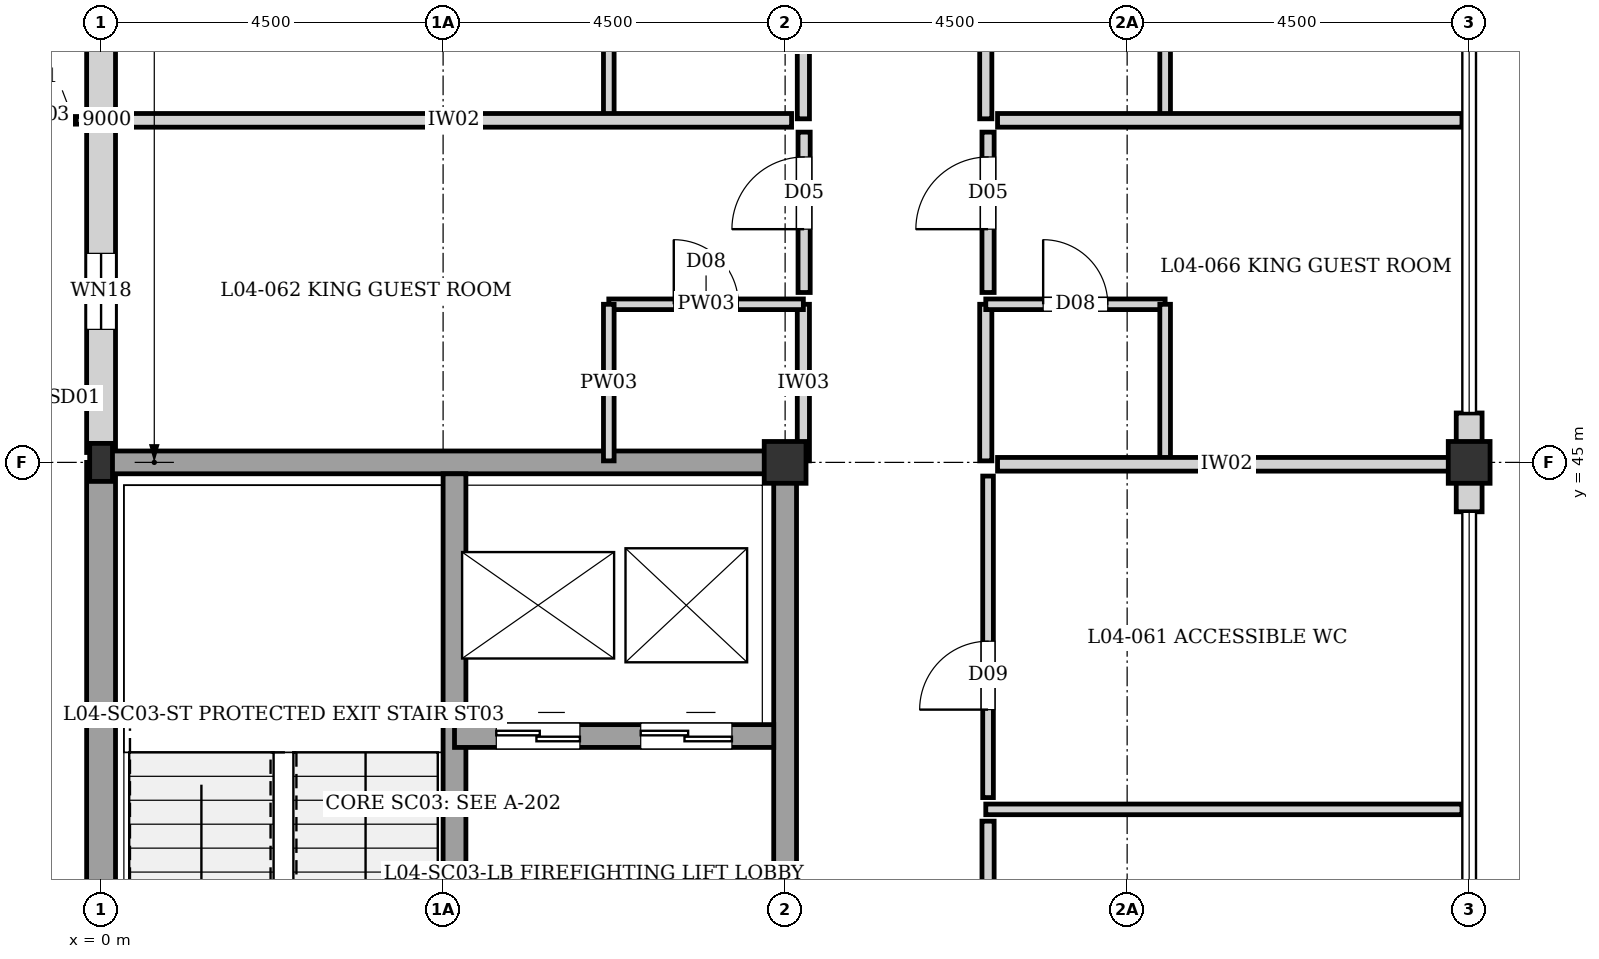
"""IFC4 building model, lengths in metres.
Left out: names, types, materials, properties, quantities, classifications, styles, units other than length and angle.
Written with IfcOpenShell. Run it as: python <this file> out.ifc"""

import sys

from ifc_helpers import new_model, si_unit, direction, frame, frame_2d, origin, origin_2d, place, context, subcontext, project, spatial, rectangle, i_section, extrude, element, fill, save


model = new_model("IFC4")
c1 = context("Model", 3, precision=1e-05, world=origin(), true_north=direction((0.0, 1.0)))
c2 = subcontext(c1, "Body", "Model", "MODEL_VIEW")
j1 = project(units=[si_unit("LENGTHUNIT", "METRE"), si_unit("PLANEANGLEUNIT", "RADIAN")], contexts=[c1])
p1 = place(None, origin())
s1 = spatial("IfcSite", under=j1, at=p1, CompositionType="ELEMENT")
p2 = place(p1, origin())
s2 = spatial("IfcBuilding", under=s1, at=p2, CompositionType="ELEMENT")
p3 = place(p2, frame((0.0, 0.0, 14.56)))
s3 = spatial("IfcBuildingStorey", under=s2, at=p3, CompositionType="ELEMENT", Elevation=14.56)
p4 = place(p3, frame((0.0, 45.0, 0.0), z_axis=(0.0, 0.0, 1.0), x_axis=(1.0, 0.0, 0.0)))
e1 = element("IfcColumn", 1, at=p4, inside=s3, PredefinedType="COLUMN", context=c2, shape_type="SweptSolid", body=[
    extrude(i_section(OverallWidth=0.3, OverallDepth=0.5, WebThickness=0.014, FlangeThickness=0.028, at=origin_2d()), origin(), (0.0, 0.0, 1.0), 3.04),
])
for number, where, z_axis, x_axis in (
    (2, (9.0, 45.0, 0.0), (0.0, 0.0, 1.0), (1.0, 0.0, 0.0)),
    (3, (18.0, 45.0, 0.0), (0.0, 0.0, 1.0), (1.0, 0.0, 0.0)),
):
    element("IfcColumn", number, at=place(p3, frame(where, z_axis=z_axis, x_axis=x_axis)), inside=s3, PredefinedType="COLUMN", context=c2, shape_type="SweptSolid", body=[
        extrude(rectangle(XDim=0.55, YDim=0.55, at=origin_2d()), origin(), (0.0, 0.0, 1.0), 3.04),
    ])
p5 = place(p3, frame((0.0, 36.0, 0.0), z_axis=(0.0, 0.0, 1.0), x_axis=(0.0, 1.0, 0.0)))
e4 = element("IfcWall", 4, at=p5, inside=s3, PredefinedType="SOLIDWALL", context=c2, shape_type="SweptSolid", body=[
    extrude(rectangle(XDim=9.0, YDim=0.38, at=frame_2d((4.5, 0.0))), origin(), (0.0, 0.0, 1.0), 2.82),
])
p6 = place(p3, frame((0.0, 45.13, 0.0), z_axis=(0.0, 0.0, 1.0), x_axis=(0.0, 1.0, 0.0)))
e5 = element("IfcWall", 5, at=p6, inside=s3, PredefinedType="SOLIDWALL", context=c2, shape_type="SweptSolid", body=[
    extrude(rectangle(XDim=8.87, YDim=0.38, at=frame_2d((4.435, 0.0))), origin(), (0.0, 0.0, 1.0), 2.82),
])
p7 = place(p6, frame((1.62, 0.0, 0.35)))
e6 = element("IfcOpeningElement", 6, at=p7, cuts=e5, PredefinedType="OPENING", context=c2, shape_type="SweptSolid", body=[
    extrude(rectangle(XDim=1.0, YDim=1.6, at=frame_2d((0.5, 0.8))), frame((0.0, 0.2, 0.0), z_axis=(0.0, -1.0, 0.0), x_axis=(1.0, 0.0, 0.0)), (0.0, 0.0, 1.0), 0.4),
])
p8 = place(p6, frame((6.12, 0.0, 0.35)))
e7 = element("IfcOpeningElement", 7, at=p8, cuts=e5, PredefinedType="OPENING", context=c2, shape_type="SweptSolid", body=[
    extrude(rectangle(XDim=1.0, YDim=1.6, at=frame_2d((0.5, 0.8))), frame((0.0, 0.2, 0.0), z_axis=(0.0, -1.0, 0.0), x_axis=(1.0, 0.0, 0.0)), (0.0, 0.0, 1.0), 0.4),
])
p9 = place(p3, frame((18.0, 45.65, 0.0), z_axis=(0.0, 0.0, 1.0), x_axis=(0.0, -1.0, 0.0)))
e8 = element("IfcWall", 8, at=p9, inside=s3, PredefinedType="SOLIDWALL", context=c2, shape_type="SweptSolid", body=[
    extrude(rectangle(XDim=0.65, YDim=0.34, at=frame_2d((0.325, 0.0))), origin(), (0.0, 0.0, 1.0), 2.82),
])
p10 = place(p3, frame((18.0, 45.0, 0.0), z_axis=(0.0, 0.0, 1.0), x_axis=(0.0, -1.0, 0.0)))
e9 = element("IfcWall", 9, at=p10, inside=s3, PredefinedType="SOLIDWALL", context=c2, shape_type="SweptSolid", body=[
    extrude(rectangle(XDim=0.65, YDim=0.34, at=frame_2d((0.325, 0.0))), origin(), (0.0, 0.0, 1.0), 2.38),
])
p11 = place(p3, frame((9.0, 36.0, 0.0), z_axis=(0.0, 0.0, 1.0), x_axis=(0.0, 1.0, 0.0)))
e10 = element("IfcWall", 10, at=p11, inside=s3, PredefinedType="SHEAR", context=c2, shape_type="SweptSolid", body=[
    extrude(rectangle(XDim=9.0, YDim=0.3, at=frame_2d((4.5, 0.0))), origin(), (0.0, 0.0, 1.0), 2.82),
])
p12 = place(p11, frame((2.05, 0.0, 0.0)))
e11 = element("IfcOpeningElement", 11, at=p12, cuts=e10, PredefinedType="OPENING", context=c2, shape_type="SweptSolid", body=[
    extrude(rectangle(XDim=1.4, YDim=2.02, at=frame_2d((0.7, 1.01))), frame((0.0, 0.16, 0.0), z_axis=(0.0, -1.0, 0.0), x_axis=(1.0, 0.0, 0.0)), (0.0, 0.0, 1.0), 0.32),
])
p13 = place(p3, frame((0.0, 45.0, 0.0), z_axis=(0.0, 0.0, 1.0), x_axis=(1.0, 0.0, 0.0)))
e12 = element("IfcWall", 12, at=p13, inside=s3, PredefinedType="SHEAR", context=c2, shape_type="SweptSolid", body=[
    extrude(rectangle(XDim=9.0, YDim=0.3, at=frame_2d((4.5, 0.0))), origin(), (0.0, 0.0, 1.0), 2.82),
])
p14 = place(p3, frame((4.65, 36.15, 0.0), z_axis=(0.0, 0.0, 1.0), x_axis=(0.0, 1.0, 0.0)))
e13 = element("IfcWall", 13, at=p14, inside=s3, PredefinedType="SHEAR", context=c2, shape_type="SweptSolid", body=[
    extrude(rectangle(XDim=8.7, YDim=0.3, at=frame_2d((4.35, 0.0))), origin(), (0.0, 0.0, 1.0), 2.82),
])
p15 = place(p14, frame((0.35, 0.0, 0.0)))
e14 = element("IfcOpeningElement", 14, at=p15, cuts=e13, PredefinedType="OPENING", context=c2, shape_type="SweptSolid", body=[
    extrude(rectangle(XDim=1.4, YDim=2.02, at=frame_2d((0.7, 1.01))), frame((0.0, 0.16, 0.0), z_axis=(0.0, -1.0, 0.0), x_axis=(1.0, 0.0, 0.0)), (0.0, 0.0, 1.0), 0.32),
])
p16 = place(p3, frame((4.65, 41.4, 0.0), z_axis=(0.0, 0.0, 1.0), x_axis=(1.0, 0.0, 0.0)))
e15 = element("IfcWall", 15, at=p16, inside=s3, PredefinedType="SHEAR", context=c2, shape_type="SweptSolid", body=[
    extrude(rectangle(XDim=4.2, YDim=0.3, at=frame_2d((2.1, 0.0))), origin(), (0.0, 0.0, 1.0), 2.82),
])
p17 = place(p16, frame((0.55, 0.0, 0.0)))
e16 = element("IfcOpeningElement", 16, at=p17, cuts=e15, PredefinedType="OPENING", context=c2, shape_type="SweptSolid", body=[
    extrude(rectangle(XDim=1.1, YDim=2.1, at=frame_2d((0.55, 1.05))), frame((0.0, 0.16, 0.0), z_axis=(0.0, -1.0, 0.0), x_axis=(1.0, 0.0, 0.0)), (0.0, 0.0, 1.0), 0.32),
])
p18 = place(p16, frame((2.45, 0.0, 0.0)))
e17 = element("IfcOpeningElement", 17, at=p18, cuts=e15, PredefinedType="OPENING", context=c2, shape_type="SweptSolid", body=[
    extrude(rectangle(XDim=1.2, YDim=2.2, at=frame_2d((0.6, 1.1))), frame((0.0, 0.16, 0.0), z_axis=(0.0, -1.0, 0.0), x_axis=(1.0, 0.0, 0.0)), (0.0, 0.0, 1.0), 0.32),
])
p19 = place(p3, frame((9.24, 45.02, 0.0), z_axis=(0.0, 0.0, 1.0), x_axis=(0.0, 1.0, 0.0)))
e18 = element("IfcWall", 18, at=p19, inside=s3, PredefinedType="PARTITIONING", context=c2, shape_type="SweptSolid", body=[
    extrude(rectangle(XDim=2.06, YDim=0.16, at=frame_2d((1.03, 0.0))), origin(), (0.0, 0.0, 1.0), 2.82),
])
p20 = place(p3, frame((6.68, 47.08, 0.0), z_axis=(0.0, 0.0, 1.0), x_axis=(1.0, 0.0, 0.0)))
e19 = element("IfcWall", 19, at=p20, inside=s3, PredefinedType="PLUMBINGWALL", context=c2, shape_type="SweptSolid", body=[
    extrude(rectangle(XDim=2.56, YDim=0.14, at=frame_2d((1.28, 0.0))), origin(), (0.0, 0.0, 1.0), 2.82),
])
p21 = place(p20, frame((0.855, 0.0, 0.0)))
e20 = element("IfcOpeningElement", 20, at=p21, cuts=e19, PredefinedType="OPENING", context=c2, shape_type="SweptSolid", body=[
    extrude(rectangle(XDim=0.85, YDim=2.04, at=frame_2d((0.425, 1.02))), frame((0.0, 0.08, 0.0), z_axis=(0.0, -1.0, 0.0), x_axis=(1.0, 0.0, 0.0)), (0.0, 0.0, 1.0), 0.16),
])
p22 = place(p3, frame((6.68, 45.02, 0.0), z_axis=(0.0, 0.0, 1.0), x_axis=(0.0, 1.0, 0.0)))
e21 = element("IfcWall", 21, at=p22, inside=s3, PredefinedType="PLUMBINGWALL", context=c2, shape_type="SweptSolid", body=[
    extrude(rectangle(XDim=2.06, YDim=0.14, at=frame_2d((1.03, 0.0))), origin(), (0.0, 0.0, 1.0), 2.82),
])
p23 = place(p3, frame((9.24, 49.52, 0.0), z_axis=(0.0, 0.0, 1.0), x_axis=(0.0, 1.0, 0.0)))
e22 = element("IfcWall", 22, at=p23, inside=s3, PredefinedType="PARTITIONING", context=c2, shape_type="SweptSolid", body=[
    extrude(rectangle(XDim=2.06, YDim=0.16, at=frame_2d((1.03, 0.0))), origin(), (0.0, 0.0, 1.0), 2.82),
])
p24 = place(p3, frame((6.68, 49.52, 0.0), z_axis=(0.0, 0.0, 1.0), x_axis=(0.0, 1.0, 0.0)))
e23 = element("IfcWall", 23, at=p24, inside=s3, PredefinedType="PLUMBINGWALL", context=c2, shape_type="SweptSolid", body=[
    extrude(rectangle(XDim=2.06, YDim=0.14, at=frame_2d((1.03, 0.0))), origin(), (0.0, 0.0, 1.0), 2.82),
])
p25 = place(p3, frame((11.64, 45.02, 0.0), z_axis=(0.0, 0.0, 1.0), x_axis=(0.0, 1.0, 0.0)))
e24 = element("IfcWall", 24, at=p25, inside=s3, PredefinedType="PARTITIONING", context=c2, shape_type="SweptSolid", body=[
    extrude(rectangle(XDim=2.06, YDim=0.16, at=frame_2d((1.03, 0.0))), origin(), (0.0, 0.0, 1.0), 2.82),
])
p26 = place(p3, frame((11.64, 47.08, 0.0), z_axis=(0.0, 0.0, 1.0), x_axis=(1.0, 0.0, 0.0)))
e25 = element("IfcWall", 25, at=p26, inside=s3, PredefinedType="PLUMBINGWALL", context=c2, shape_type="SweptSolid", body=[
    extrude(rectangle(XDim=2.36, YDim=0.14, at=frame_2d((1.18, 0.0))), origin(), (0.0, 0.0, 1.0), 2.82),
])
p27 = place(p26, frame((0.755, 0.0, 0.0)))
e26 = element("IfcOpeningElement", 26, at=p27, cuts=e25, PredefinedType="OPENING", context=c2, shape_type="SweptSolid", body=[
    extrude(rectangle(XDim=0.85, YDim=2.04, at=frame_2d((0.425, 1.02))), frame((0.0, 0.08, 0.0), z_axis=(0.0, -1.0, 0.0), x_axis=(1.0, 0.0, 0.0)), (0.0, 0.0, 1.0), 0.16),
])
p28 = place(p3, frame((14.0, 45.02, 0.0), z_axis=(0.0, 0.0, 1.0), x_axis=(0.0, 1.0, 0.0)))
e27 = element("IfcWall", 27, at=p28, inside=s3, PredefinedType="PLUMBINGWALL", context=c2, shape_type="SweptSolid", body=[
    extrude(rectangle(XDim=2.06, YDim=0.14, at=frame_2d((1.03, 0.0))), origin(), (0.0, 0.0, 1.0), 2.82),
])
p29 = place(p3, frame((11.64, 49.52, 0.0), z_axis=(0.0, 0.0, 1.0), x_axis=(0.0, 1.0, 0.0)))
e28 = element("IfcWall", 28, at=p29, inside=s3, PredefinedType="PARTITIONING", context=c2, shape_type="SweptSolid", body=[
    extrude(rectangle(XDim=2.06, YDim=0.16, at=frame_2d((1.03, 0.0))), origin(), (0.0, 0.0, 1.0), 2.82),
])
p30 = place(p3, frame((14.0, 49.52, 0.0), z_axis=(0.0, 0.0, 1.0), x_axis=(0.0, 1.0, 0.0)))
e29 = element("IfcWall", 29, at=p30, inside=s3, PredefinedType="PLUMBINGWALL", context=c2, shape_type="SweptSolid", body=[
    extrude(rectangle(XDim=2.06, YDim=0.14, at=frame_2d((1.03, 0.0))), origin(), (0.0, 0.0, 1.0), 2.82),
])
p31 = place(p3, frame((11.795, 44.975, 0.0), z_axis=(0.0, 0.0, 1.0), x_axis=(1.0, 0.0, 0.0)))
e30 = element("IfcWall", 30, at=p31, inside=s3, PredefinedType="PARTITIONING", context=c2, shape_type="SweptSolid", body=[
    extrude(rectangle(XDim=6.03, YDim=0.18, at=frame_2d((3.015, 0.0))), origin(), (0.0, 0.0, 1.0), 2.38),
])
p32 = place(p3, frame((0.195, 49.5, 0.0), z_axis=(0.0, 0.0, 1.0), x_axis=(1.0, 0.0, 0.0)))
e31 = element("IfcWall", 31, at=p32, inside=s3, PredefinedType="PARTITIONING", context=c2, shape_type="SweptSolid", body=[
    extrude(rectangle(XDim=8.89, YDim=0.18, at=frame_2d((4.445, 0.0))), origin(), (0.0, 0.0, 1.0), 2.82),
])
p33 = place(p3, frame((11.795, 49.5, 0.0), z_axis=(0.0, 0.0, 1.0), x_axis=(1.0, 0.0, 0.0)))
e32 = element("IfcWall", 32, at=p33, inside=s3, PredefinedType="PARTITIONING", context=c2, shape_type="SweptSolid", body=[
    extrude(rectangle(XDim=6.11, YDim=0.18, at=frame_2d((3.055, 0.0))), origin(), (0.0, 0.0, 1.0), 2.82),
])
p34 = place(p3, frame((11.64, 40.435, 0.0), z_axis=(0.0, 0.0, 1.0), x_axis=(1.0, 0.0, 0.0)))
e33 = element("IfcWall", 33, at=p34, inside=s3, PredefinedType="PLUMBINGWALL", context=c2, shape_type="SweptSolid", body=[
    extrude(rectangle(XDim=6.265, YDim=0.14, at=frame_2d((3.133, 0.0))), origin(), (0.0, 0.0, 1.0), 2.82),
])
p35 = place(p3, frame((11.67, 36.155, 0.0), z_axis=(0.0, 0.0, 1.0), x_axis=(0.0, 1.0, 0.0)))
e34 = element("IfcWall", 34, at=p35, inside=s3, PredefinedType="PARTITIONING", context=c2, shape_type="SweptSolid", body=[
    extrude(rectangle(XDim=4.125, YDim=0.16, at=frame_2d((2.062, 0.0))), origin(), (0.0, 0.0, 1.0), 2.82),
])
p36 = place(p35, frame((2.058, 0.0, 0.0)))
e35 = element("IfcOpeningElement", 35, at=p36, cuts=e34, PredefinedType="OPENING", context=c2, shape_type="SweptSolid", body=[
    extrude(rectangle(XDim=1.0, YDim=2.1, at=frame_2d((0.5, 1.05))), frame((0.0, 0.09, 0.0), z_axis=(0.0, -1.0, 0.0), x_axis=(1.0, 0.0, 0.0)), (0.0, 0.0, 1.0), 0.18),
])
p37 = place(p3, frame((11.67, 40.59, 0.0), z_axis=(0.0, 0.0, 1.0), x_axis=(0.0, 1.0, 0.0)))
e36 = element("IfcWall", 36, at=p37, inside=s3, PredefinedType="PLUMBINGWALL", context=c2, shape_type="SweptSolid", body=[
    extrude(rectangle(XDim=4.23, YDim=0.14, at=frame_2d((2.115, 0.0))), origin(), (0.0, 0.0, 1.0), 2.82),
])
p38 = place(p37, frame((1.157, 0.0, 0.0)))
e37 = element("IfcOpeningElement", 37, at=p38, cuts=e36, PredefinedType="OPENING", context=c2, shape_type="SweptSolid", body=[
    extrude(rectangle(XDim=0.9, YDim=2.1, at=frame_2d((0.45, 1.05))), frame((0.0, 0.08, 0.0), z_axis=(0.0, -1.0, 0.0), x_axis=(1.0, 0.0, 0.0)), (0.0, 0.0, 1.0), 0.16),
])
p39 = place(p3, frame((9.25, 47.235, 0.0), z_axis=(0.0, 0.0, 1.0), x_axis=(0.0, 1.0, 0.0)))
e38 = element("IfcWall", 38, at=p39, inside=s3, PredefinedType="PARTITIONING", context=c2, shape_type="SweptSolid", body=[
    extrude(rectangle(XDim=2.11, YDim=0.16, at=frame_2d((1.055, 0.0))), origin(), (0.0, 0.0, 1.0), 2.82),
])
p40 = place(p39, frame((0.833, 0.0, 0.0)))
e39 = element("IfcOpeningElement", 39, at=p40, cuts=e38, PredefinedType="OPENING", context=c2, shape_type="SweptSolid", body=[
    extrude(rectangle(XDim=0.95, YDim=2.15, at=frame_2d((0.475, 1.075))), frame((0.0, 0.09, 0.0), z_axis=(0.0, -1.0, 0.0), x_axis=(1.0, 0.0, 0.0)), (0.0, 0.0, 1.0), 0.18),
])
p41 = place(p3, frame((11.67, 47.235, 0.0), z_axis=(0.0, 0.0, 1.0), x_axis=(0.0, 1.0, 0.0)))
e40 = element("IfcWall", 40, at=p41, inside=s3, PredefinedType="PARTITIONING", context=c2, shape_type="SweptSolid", body=[
    extrude(rectangle(XDim=2.11, YDim=0.16, at=frame_2d((1.055, 0.0))), origin(), (0.0, 0.0, 1.0), 2.82),
])
p42 = place(p41, frame((0.833, 0.0, 0.0)))
e41 = element("IfcOpeningElement", 41, at=p42, cuts=e40, PredefinedType="OPENING", context=c2, shape_type="SweptSolid", body=[
    extrude(rectangle(XDim=0.95, YDim=2.15, at=frame_2d((0.475, 1.075))), frame((0.0, 0.09, 0.0), z_axis=(0.0, -1.0, 0.0), x_axis=(1.0, 0.0, 0.0)), (0.0, 0.0, 1.0), 0.18),
])
p43 = place(p7, origin())
e42 = element("IfcWindow", 42, at=p43, inside=s3, PartitioningType="SINGLE_PANEL", PredefinedType="WINDOW", context=c2, shape_type="SweptSolid", body=[
    extrude(rectangle(XDim=1.0, YDim=1.6, at=frame_2d((0.5, 0.8))), frame((0.0, 0.03, 0.0), z_axis=(0.0, -1.0, 0.0), x_axis=(1.0, 0.0, 0.0)), (0.0, 0.0, 1.0), 0.06),
])
fill(e6, e42)
p44 = place(p17, origin())
e43 = element("IfcDoor", 43, at=p44, inside=s3, OperationType="DOUBLE_DOOR_SLIDING", PredefinedType="DOOR", context=c2, shape_type="SweptSolid", body=[
    extrude(rectangle(XDim=1.1, YDim=2.1, at=frame_2d((0.55, 1.05))), frame((0.0, 0.025, 0.0), z_axis=(0.0, -1.0, 0.0), x_axis=(1.0, 0.0, 0.0)), (0.0, 0.0, 1.0), 0.05),
])
fill(e16, e43)
p45 = place(p18, origin())
e44 = element("IfcDoor", 44, at=p45, inside=s3, OperationType="DOUBLE_DOOR_SLIDING", PredefinedType="DOOR", context=c2, shape_type="SweptSolid", body=[
    extrude(rectangle(XDim=1.2, YDim=2.2, at=frame_2d((0.6, 1.1))), frame((0.0, 0.025, 0.0), z_axis=(0.0, -1.0, 0.0), x_axis=(1.0, 0.0, 0.0)), (0.0, 0.0, 1.0), 0.05),
])
fill(e17, e44)
p46 = place(p21, origin())
e45 = element("IfcDoor", 45, at=p46, inside=s3, OperationType="SINGLE_SWING_LEFT", PredefinedType="DOOR", context=c2, shape_type="SweptSolid", body=[
    extrude(rectangle(XDim=0.85, YDim=2.04, at=frame_2d((0.425, 1.02))), frame((0.0, 0.025, 0.0), z_axis=(0.0, -1.0, 0.0), x_axis=(1.0, 0.0, 0.0)), (0.0, 0.0, 1.0), 0.05),
])
fill(e20, e45)
p47 = place(p27, origin())
e46 = element("IfcDoor", 46, at=p47, inside=s3, OperationType="SINGLE_SWING_LEFT", PredefinedType="DOOR", context=c2, shape_type="SweptSolid", body=[
    extrude(rectangle(XDim=0.85, YDim=2.04, at=frame_2d((0.425, 1.02))), frame((0.0, 0.025, 0.0), z_axis=(0.0, -1.0, 0.0), x_axis=(1.0, 0.0, 0.0)), (0.0, 0.0, 1.0), 0.05),
])
fill(e26, e46)
p48 = place(p38, origin())
e47 = element("IfcDoor", 47, at=p48, inside=s3, OperationType="SINGLE_SWING_LEFT", PredefinedType="DOOR", context=c2, shape_type="SweptSolid", body=[
    extrude(rectangle(XDim=0.9, YDim=2.1, at=frame_2d((0.45, 1.05))), frame((0.0, 0.025, 0.0), z_axis=(0.0, -1.0, 0.0), x_axis=(1.0, 0.0, 0.0)), (0.0, 0.0, 1.0), 0.05),
])
fill(e37, e47)
p49 = place(p40, origin())
e48 = element("IfcDoor", 48, at=p49, inside=s3, OperationType="SINGLE_SWING_LEFT", PredefinedType="DOOR", context=c2, shape_type="SweptSolid", body=[
    extrude(rectangle(XDim=0.95, YDim=2.15, at=frame_2d((0.475, 1.075))), frame((0.0, 0.025, 0.0), z_axis=(0.0, -1.0, 0.0), x_axis=(1.0, 0.0, 0.0)), (0.0, 0.0, 1.0), 0.05),
])
fill(e39, e48)
p50 = place(p42, origin())
e49 = element("IfcDoor", 49, at=p50, inside=s3, OperationType="SINGLE_SWING_LEFT", PredefinedType="DOOR", context=c2, shape_type="SweptSolid", body=[
    extrude(rectangle(XDim=0.95, YDim=2.15, at=frame_2d((0.475, 1.075))), frame((0.0, 0.025, 0.0), z_axis=(0.0, -1.0, 0.0), x_axis=(1.0, 0.0, 0.0)), (0.0, 0.0, 1.0), 0.05),
])
fill(e41, e49)
save(model, sys.argv[1])
